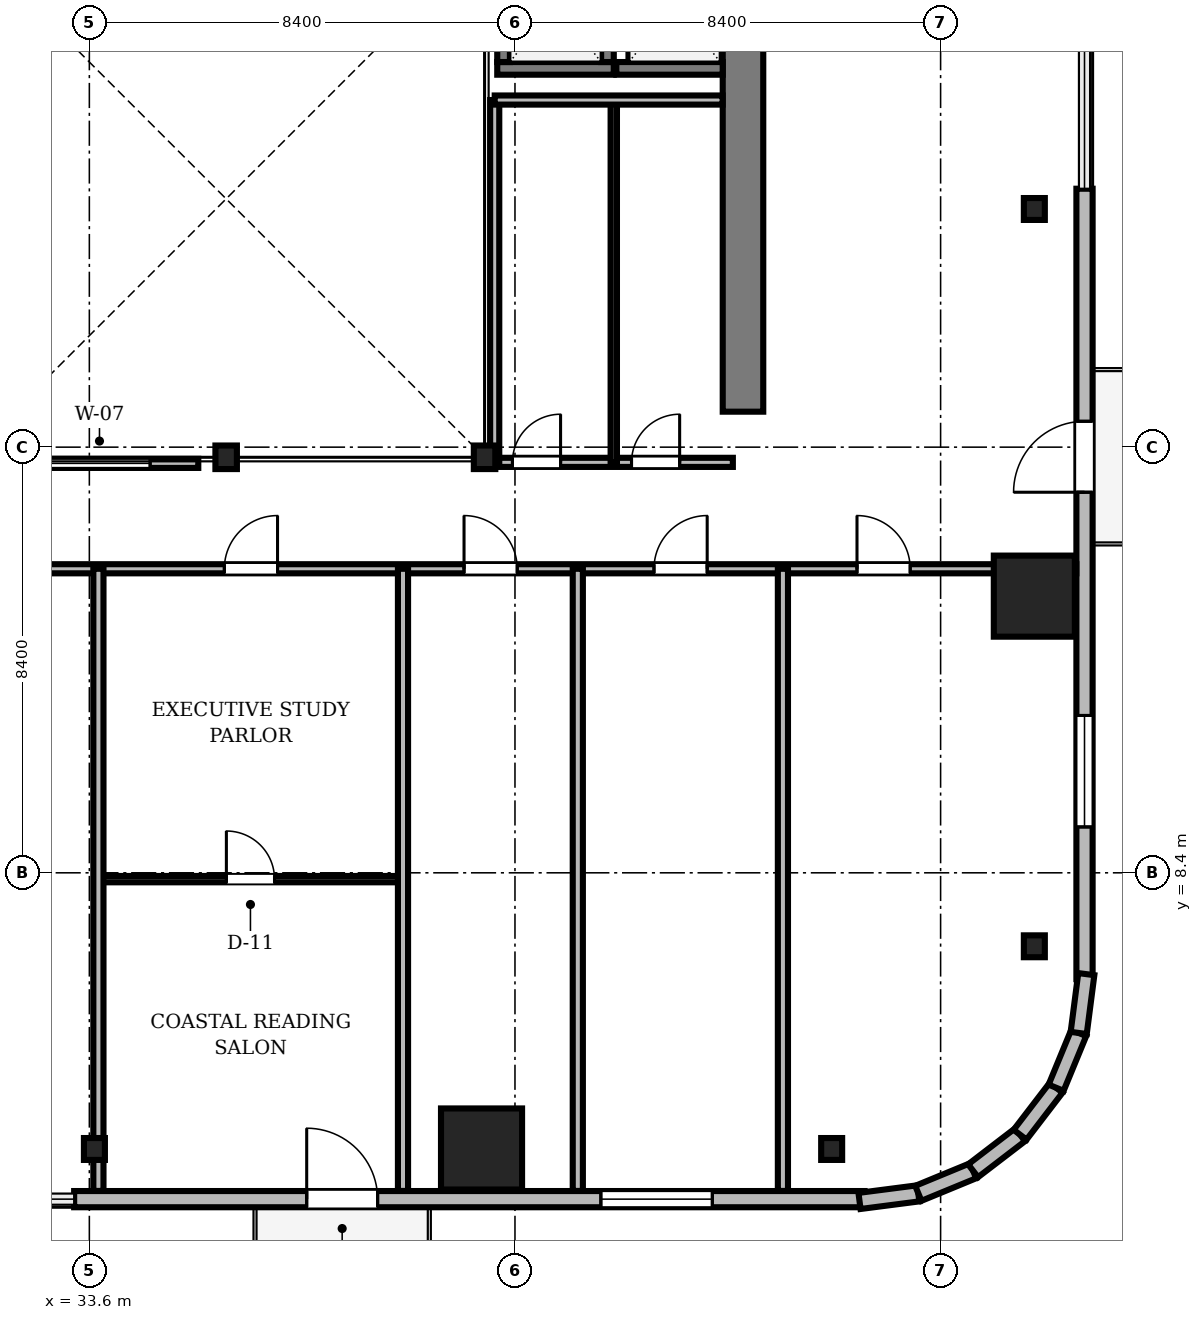
"""IFC4 building model, lengths in metres.
Left out: names, types, materials, properties, quantities, classifications, styles, units other than length and angle.
Written with IfcOpenShell. Run it as: python <this file> out.ifc"""

import sys

from ifc_helpers import new_model, si_unit, direction, frame, frame_2d, origin, origin_2d, place, context, subcontext, project, spatial, rectangle, i_section, extrude, source, transform, mapped, element, fill, save


model = new_model("IFC4")
c1 = context("Model", 3, precision=1e-05, world=origin(), true_north=direction((0.0, 1.0)))
c2 = subcontext(c1, "Body", "Model", "MODEL_VIEW")
j1 = project(units=[si_unit("LENGTHUNIT", "METRE"), si_unit("PLANEANGLEUNIT", "RADIAN")], contexts=[c1])
p1 = place(None, origin())
s1 = spatial("IfcSite", under=j1, at=p1, CompositionType="ELEMENT")
p2 = place(p1, origin())
s2 = spatial("IfcBuilding", under=s1, at=p2, CompositionType="ELEMENT")
p3 = place(p2, frame((0.0, 0.0, 137.2)))
s3 = spatial("IfcBuildingStorey", under=s2, at=p3, CompositionType="ELEMENT", Elevation=137.2)
m1 = source(origin(), c2, "Body", "SweptSolid", [
    extrude(rectangle(XDim=13.15, YDim=0.8, at=frame_2d((6.575, 0.0))), origin(), (0.0, 0.0, 1.0), 3.46),
])
p4 = place(p3, frame((46.5, 17.5, 0.0), z_axis=(0.0, 0.0, 1.0), x_axis=(0.0, 1.0, 0.0)))
e1 = element("IfcWall", 1, at=p4, inside=s3, PredefinedType="SHEAR", context=c2, shape_type="MappedRepresentation", body=[
    mapped(m1, transform((0.0, 0.0, 0.0), scale=1.0)),
])
m2 = source(origin(), c2, "Body", "SweptSolid", [
    extrude(i_section(OverallWidth=0.424, OverallDepth=0.465, WebThickness=0.035, FlangeThickness=0.056, FilletRadius=0.015, at=origin_2d()), origin(), (0.0, 0.0, 1.0), 3.46),
])
for number, where, z_axis, x_axis in (
    (2, (36.3, 16.6, 0.0), (0.0, 0.0, 1.0), (1.0, 0.0, 0.0)),
    (3, (41.4, 16.6, 0.0), (0.0, 0.0, 1.0), (1.0, 0.0, 0.0)),
):
    element("IfcColumn", number, at=place(p3, frame(where, z_axis=z_axis, x_axis=x_axis)), inside=s3, PredefinedType="COLUMN", context=c2, shape_type="MappedRepresentation", body=[
        mapped(m2, transform((0.0, 0.0, 0.0), scale=1.0)),
    ])
m3 = source(origin(), c2, "Body", "SweptSolid", [
    extrude(rectangle(XDim=1.6, YDim=1.6, at=origin_2d()), origin(), (0.0, 0.0, 1.0), 3.46),
])
for number, where, z_axis, x_axis in (
    (4, (41.34, 2.95, 0.0), (0.0, 0.0, 1.0), (1.0, 0.0, 0.0)),
    (5, (52.25, 13.86, 0.0), (0.0, 0.0, 1.0), (1.0, 0.0, 0.0)),
):
    element("IfcColumn", number, at=place(p3, frame(where, z_axis=z_axis, x_axis=x_axis)), inside=s3, PredefinedType="COLUMN", context=c2, shape_type="MappedRepresentation", body=[
        mapped(m3, transform((0.0, 0.0, 0.0), scale=1.0)),
    ])
m4 = source(origin(), c2, "Body", "SweptSolid", [
    extrude(i_section(OverallWidth=0.414, OverallDepth=0.432, WebThickness=0.026, FlangeThickness=0.04, FilletRadius=0.015, at=origin_2d()), origin(), (0.0, 0.0, 1.0), 3.46),
])
for number, where, z_axis, x_axis in (
    (6, (33.7, 2.95, 0.0), (0.0, 0.0, 1.0), (1.0, 0.0, 0.0)),
    (7, (48.25, 2.95, 0.0), (0.0, 0.0, 1.0), (1.0, 0.0, 0.0)),
    (8, (52.25, 6.95, 0.0), (0.0, 0.0, 1.0), (1.0, 0.0, 0.0)),
    (9, (52.25, 21.5, 0.0), (0.0, 0.0, 1.0), (1.0, 0.0, 0.0)),
):
    element("IfcColumn", number, at=place(p3, frame(where, z_axis=z_axis, x_axis=x_axis)), inside=s3, PredefinedType="COLUMN", context=c2, shape_type="MappedRepresentation", body=[
        mapped(m4, transform((0.0, 0.0, 0.0), scale=1.0)),
    ])
m5 = source(origin(), c2, "Body", "SweptSolid", [
    extrude(rectangle(XDim=15.6, YDim=0.32, at=frame_2d((7.8, 0.0))), origin(), (0.0, 0.0, 1.0), 3.46),
])
p5 = place(p3, frame((33.3, 1.96, 0.0), z_axis=(0.0, 0.0, 1.0), x_axis=(1.0, 0.0, 0.0)))
e10 = element("IfcWall", 10, at=p5, inside=s3, PredefinedType="SOLIDWALL", context=c2, shape_type="MappedRepresentation", body=[
    mapped(m5, transform((0.0, 0.0, 0.0), scale=1.0)),
])
m6 = source(origin(), c2, "Body", "SweptSolid", [
    extrude(rectangle(XDim=1.4, YDim=2.3, at=frame_2d((0.7, 1.15))), frame((0.0, 0.17, 0.0), z_axis=(0.0, -1.0, 0.0), x_axis=(1.0, 0.0, 0.0)), (0.0, 0.0, 1.0), 0.34),
])
p6 = place(p5, frame((4.59, 0.0, 0.0)))
e11 = element("IfcOpeningElement", 11, at=p6, cuts=e10, PredefinedType="OPENING", context=c2, shape_type="MappedRepresentation", body=[
    mapped(m6, transform((0.0, 0.0, 0.0), scale=1.0)),
])
m7 = source(origin(), c2, "Body", "SweptSolid", [
    extrude(rectangle(XDim=2.2, YDim=2.4, at=frame_2d((1.1, 1.2))), frame((0.0, 0.17, 0.0), z_axis=(0.0, -1.0, 0.0), x_axis=(1.0, 0.0, 0.0)), (0.0, 0.0, 1.0), 0.34),
])
p7 = place(p5, frame((10.395, 0.0, 0.72)))
e12 = element("IfcOpeningElement", 12, at=p7, cuts=e10, PredefinedType="OPENING", context=c2, shape_type="MappedRepresentation", body=[
    mapped(m7, transform((0.0, 0.0, 0.0), scale=1.0)),
])
p8 = place(p3, frame((53.24, 6.3, 0.0), z_axis=(0.0, 0.0, 1.0), x_axis=(0.0, 1.0, 0.0)))
e13 = element("IfcWall", 13, at=p8, inside=s3, PredefinedType="SOLIDWALL", context=c2, shape_type="MappedRepresentation", body=[
    mapped(m5, transform((0.0, 0.0, 0.0), scale=1.0)),
])
p9 = place(p8, frame((9.61, 0.0, 0.0)))
e14 = element("IfcOpeningElement", 14, at=p9, cuts=e13, PredefinedType="OPENING", context=c2, shape_type="MappedRepresentation", body=[
    mapped(m6, transform((0.0, 0.0, 0.0), scale=1.0)),
])
p10 = place(p8, frame((3.005, 0.0, 0.72)))
e15 = element("IfcOpeningElement", 15, at=p10, cuts=e13, PredefinedType="OPENING", context=c2, shape_type="MappedRepresentation", body=[
    mapped(m7, transform((0.0, 0.0, 0.0), scale=1.0)),
])
m8 = source(origin(), c2, "Body", "SweptSolid", [
    extrude(rectangle(XDim=1.17, YDim=0.32, at=frame_2d((0.585, 0.0))), origin(), (0.0, 0.0, 1.0), 3.46),
])
p11 = place(p3, frame((48.8, 1.925, 0.0), z_axis=(0.0, 0.0, 1.0), x_axis=(0.991762485493, 0.128090485085, 0.0)))
e16 = element("IfcWall", 16, at=p11, inside=s3, PredefinedType="SOLIDWALL", context=c2, shape_type="MappedRepresentation", body=[
    mapped(m8, transform((0.0, 0.0, 0.0), scale=1.0)),
])
m9 = source(origin(), c2, "Body", "SweptSolid", [
    extrude(rectangle(XDim=1.169, YDim=0.32, at=frame_2d((0.585, 0.0))), origin(), (0.0, 0.0, 1.0), 3.46),
])
p12 = place(p3, frame((49.96, 2.074, 0.0), z_axis=(0.0, 0.0, 1.0), x_axis=(0.924479075121, 0.381232789334, 0.0)))
e17 = element("IfcWall", 17, at=p12, inside=s3, PredefinedType="SOLIDWALL", context=c2, shape_type="MappedRepresentation", body=[
    mapped(m9, transform((0.0, 0.0, 0.0), scale=1.0)),
])
m10 = source(origin(), c2, "Body", "SweptSolid", [
    extrude(rectangle(XDim=1.169, YDim=0.32, at=frame_2d((0.584, 0.0))), origin(), (0.0, 0.0, 1.0), 3.46),
])
p13 = place(p3, frame((51.041, 2.52, 0.0), z_axis=(0.0, 0.0, 1.0), x_axis=(0.793663520347, 0.608356981114, 0.0)))
e18 = element("IfcWall", 18, at=p13, inside=s3, PredefinedType="SOLIDWALL", context=c2, shape_type="MappedRepresentation", body=[
    mapped(m10, transform((0.0, 0.0, 0.0), scale=1.0)),
])
m11 = source(origin(), c2, "Body", "SweptSolid", [
    extrude(rectangle(XDim=1.169, YDim=0.32, at=frame_2d((0.584, 0.0))), origin(), (0.0, 0.0, 1.0), 3.46),
])
for number, where, z_axis, x_axis in (
    (19, (51.969, 3.231, 0.0), (0.0, 0.0, 1.0), (0.608, 0.794, 0.0)),
    (20, (52.68, 4.159, 0.0), (0.0, 0.0, 1.0), (0.381, 0.925, 0.0)),
):
    element("IfcWall", number, at=place(p3, frame(where, z_axis=z_axis, x_axis=x_axis)), inside=s3, PredefinedType="SOLIDWALL", context=c2, shape_type="MappedRepresentation", body=[
        mapped(m11, transform((0.0, 0.0, 0.0), scale=1.0)),
    ])
m12 = source(origin(), c2, "Body", "SweptSolid", [
    extrude(rectangle(XDim=1.171, YDim=0.32, at=frame_2d((0.585, 0.0))), origin(), (0.0, 0.0, 1.0), 3.46),
])
p14 = place(p3, frame((53.125, 5.24, 0.0), z_axis=(0.0, 0.0, 1.0), x_axis=(0.128269133229, 0.991739395941, 0.0)))
e21 = element("IfcWall", 21, at=p14, inside=s3, PredefinedType="SOLIDWALL", context=c2, shape_type="MappedRepresentation", body=[
    mapped(m12, transform((0.0, 0.0, 0.0), scale=1.0)),
])
m13 = source(origin(), c2, "Body", "SweptSolid", [
    extrude(rectangle(XDim=2.3, YDim=0.25, at=frame_2d((1.15, 0.0))), origin(), (0.0, 0.0, 1.0), 3.46),
])
for number, where, z_axis, x_axis in (
    (22, (41.65, 24.275, 0.0), (0.0, 0.0, 1.0), (1.0, 0.0, 0.0)),
    (23, (41.775, 24.4, 0.0), (0.0, 0.0, 1.0), (0.0, 1.0, 0.0)),
    (24, (43.825, 24.4, 0.0), (0.0, 0.0, 1.0), (0.0, 1.0, 0.0)),
):
    element("IfcWall", number, at=place(p3, frame(where, z_axis=z_axis, x_axis=x_axis)), inside=s3, PredefinedType="SOLIDWALL", context=c2, shape_type="MappedRepresentation", body=[
        mapped(m13, transform((0.0, 0.0, 0.0), scale=1.0)),
    ])
m14 = source(origin(), c2, "Body", "SweptSolid", [
    extrude(rectangle(XDim=2.1, YDim=0.25, at=frame_2d((1.05, 0.0))), origin(), (0.0, 0.0, 1.0), 3.46),
])
p15 = place(p3, frame((44.0, 24.275, 0.0), z_axis=(0.0, 0.0, 1.0), x_axis=(1.0, 0.0, 0.0)))
e25 = element("IfcWall", 25, at=p15, inside=s3, PredefinedType="SOLIDWALL", context=c2, shape_type="MappedRepresentation", body=[
    mapped(m14, transform((0.0, 0.0, 0.0), scale=1.0)),
])
m15 = source(origin(), c2, "Body", "SweptSolid", [
    extrude(rectangle(XDim=46.156, YDim=0.18, at=frame_2d((23.078, 0.0))), origin(), (0.0, 0.0, 1.0), 2.702),
])
p16 = place(p3, frame((6.922, 14.4, 0.0), z_axis=(0.0, 0.0, 1.0), x_axis=(1.0, 0.0, 0.0)))
e26 = element("IfcWall", 26, at=p16, inside=s3, PredefinedType="PARTITIONING", context=c2, shape_type="MappedRepresentation", body=[
    mapped(m15, transform((0.0, 0.0, 0.0), scale=1.0)),
])
m16 = source(origin(), c2, "Body", "SweptSolid", [
    extrude(rectangle(XDim=1.05, YDim=2.2, at=frame_2d((0.525, 1.1))), frame((0.0, 0.1, 0.0), z_axis=(0.0, -1.0, 0.0), x_axis=(1.0, 0.0, 0.0)), (0.0, 0.0, 1.0), 0.2),
])
p17 = place(p16, frame((14.998, 0.0, 0.0)))
e27 = element("IfcOpeningElement", 27, at=p17, cuts=e26, PredefinedType="OPENING", context=c2, shape_type="MappedRepresentation", body=[
    mapped(m16, transform((0.0, 0.0, 0.0), scale=1.0)),
])
p18 = place(p16, frame((17.553, 0.0, 0.0)))
e28 = element("IfcOpeningElement", 28, at=p18, cuts=e26, PredefinedType="OPENING", context=c2, shape_type="MappedRepresentation", body=[
    mapped(m16, transform((0.0, 0.0, 0.0), scale=1.0)),
])
p19 = place(p16, frame((21.003, 0.0, 0.0)))
e29 = element("IfcOpeningElement", 29, at=p19, cuts=e26, PredefinedType="OPENING", context=c2, shape_type="MappedRepresentation", body=[
    mapped(m16, transform((0.0, 0.0, 0.0), scale=1.0)),
])
p20 = place(p16, frame((24.532, 0.0, 0.0)))
e30 = element("IfcOpeningElement", 30, at=p20, cuts=e26, PredefinedType="OPENING", context=c2, shape_type="MappedRepresentation", body=[
    mapped(m16, transform((0.0, 0.0, 0.0), scale=1.0)),
])
p21 = place(p16, frame((29.342, 0.0, 0.0)))
e31 = element("IfcOpeningElement", 31, at=p21, cuts=e26, PredefinedType="OPENING", context=c2, shape_type="MappedRepresentation", body=[
    mapped(m16, transform((0.0, 0.0, 0.0), scale=1.0)),
])
p22 = place(p16, frame((34.073, 0.0, 0.0)))
e32 = element("IfcOpeningElement", 32, at=p22, cuts=e26, PredefinedType="OPENING", context=c2, shape_type="MappedRepresentation", body=[
    mapped(m16, transform((0.0, 0.0, 0.0), scale=1.0)),
])
p23 = place(p16, frame((37.822, 0.0, 0.0)))
e33 = element("IfcOpeningElement", 33, at=p23, cuts=e26, PredefinedType="OPENING", context=c2, shape_type="MappedRepresentation", body=[
    mapped(m16, transform((0.0, 0.0, 0.0), scale=1.0)),
])
p24 = place(p16, frame((41.828, 0.0, 0.0)))
e34 = element("IfcOpeningElement", 34, at=p24, cuts=e26, PredefinedType="OPENING", context=c2, shape_type="MappedRepresentation", body=[
    mapped(m16, transform((0.0, 0.0, 0.0), scale=1.0)),
])
m17 = source(origin(), c2, "Body", "SweptSolid", [
    extrude(rectangle(XDim=6.011, YDim=0.125, at=frame_2d((3.005, 0.0))), origin(), (0.0, 0.0, 1.0), 2.852),
])
p25 = place(p3, frame((33.779, 8.275, 0.0), z_axis=(0.0, 0.0, 1.0), x_axis=(1.0, 0.0, 0.0)))
e35 = element("IfcWall", 35, at=p25, inside=s3, PredefinedType="PARTITIONING", context=c2, shape_type="MappedRepresentation", body=[
    mapped(m17, transform((0.0, 0.0, 0.0), scale=1.0)),
])
m18 = source(origin(), c2, "Body", "SweptSolid", [
    extrude(rectangle(XDim=0.95, YDim=2.15, at=frame_2d((0.475, 1.075))), frame((0.0, 0.073, 0.0), z_axis=(0.0, -1.0, 0.0), x_axis=(1.0, 0.0, 0.0)), (0.0, 0.0, 1.0), 0.145),
])
p26 = place(p25, frame((2.525, 0.0, 0.0)))
e36 = element("IfcOpeningElement", 36, at=p26, cuts=e35, PredefinedType="OPENING", context=c2, shape_type="MappedRepresentation", body=[
    mapped(m18, transform((0.0, 0.0, 0.0), scale=1.0)),
])
m19 = source(origin(), c2, "Body", "SweptSolid", [
    extrude(rectangle(XDim=4.7, YDim=0.18, at=frame_2d((2.35, 0.0))), origin(), (0.0, 0.0, 1.0), 2.852),
])
p27 = place(p3, frame((41.6, 16.5, 0.0), z_axis=(0.0, 0.0, 1.0), x_axis=(1.0, 0.0, 0.0)))
e37 = element("IfcWall", 37, at=p27, inside=s3, PredefinedType="PARTITIONING", context=c2, shape_type="MappedRepresentation", body=[
    mapped(m19, transform((0.0, 0.0, 0.0), scale=1.0)),
])
m20 = source(origin(), c2, "Body", "SweptSolid", [
    extrude(rectangle(XDim=0.95, YDim=2.15, at=frame_2d((0.475, 1.075))), frame((0.0, 0.1, 0.0), z_axis=(0.0, -1.0, 0.0), x_axis=(1.0, 0.0, 0.0)), (0.0, 0.0, 1.0), 0.2),
])
p28 = place(p27, frame((0.35, 0.0, 0.0)))
e38 = element("IfcOpeningElement", 38, at=p28, cuts=e37, PredefinedType="OPENING", context=c2, shape_type="MappedRepresentation", body=[
    mapped(m20, transform((0.0, 0.0, 0.0), scale=1.0)),
])
p29 = place(p27, frame((2.7, 0.0, 0.0)))
e39 = element("IfcOpeningElement", 39, at=p29, cuts=e37, PredefinedType="OPENING", context=c2, shape_type="MappedRepresentation", body=[
    mapped(m20, transform((0.0, 0.0, 0.0), scale=1.0)),
])
m21 = source(origin(), c2, "Body", "SweptSolid", [
    extrude(rectangle(XDim=12.278, YDim=0.2, at=frame_2d((6.139, 0.0))), origin(), (0.0, 0.0, 1.0), 2.702),
])
for number, where, z_axis, x_axis in (
    (40, (33.779, 2.122, 0.0), (0.0, 0.0, 1.0), (0.0, 1.0, 0.0)),
    (41, (39.79, 2.122, 0.0), (0.0, 0.0, 1.0), (0.0, 1.0, 0.0)),
    (42, (43.24, 2.122, 0.0), (0.0, 0.0, 1.0), (0.0, 1.0, 0.0)),
    (43, (47.288, 2.122, 0.0), (0.0, 0.0, 1.0), (0.0, 1.0, 0.0)),
):
    element("IfcWall", number, at=place(p3, frame(where, z_axis=z_axis, x_axis=x_axis)), inside=s3, PredefinedType="PARTITIONING", context=c2, shape_type="MappedRepresentation", body=[
        mapped(m21, transform((0.0, 0.0, 0.0), scale=1.0)),
    ])
m22 = source(origin(), c2, "Body", "SweptSolid", [
    extrude(rectangle(XDim=7.15, YDim=0.18, at=frame_2d((3.575, 0.0))), origin(), (0.0, 0.0, 1.0), 2.852),
])
p30 = place(p3, frame((41.6, 16.5, 0.0), z_axis=(0.0, 0.0, 1.0), x_axis=(0.0, 1.0, 0.0)))
e44 = element("IfcWall", 44, at=p30, inside=s3, PredefinedType="PARTITIONING", context=c2, shape_type="MappedRepresentation", body=[
    mapped(m22, transform((0.0, 0.0, 0.0), scale=1.0)),
])
m23 = source(origin(), c2, "Body", "SweptSolid", [
    extrude(rectangle(XDim=7.15, YDim=0.125, at=frame_2d((3.575, 0.0))), origin(), (0.0, 0.0, 1.0), 2.852),
])
p31 = place(p3, frame((43.95, 16.5, 0.0), z_axis=(0.0, 0.0, 1.0), x_axis=(0.0, 1.0, 0.0)))
e45 = element("IfcWall", 45, at=p31, inside=s3, PredefinedType="PARTITIONING", context=c2, shape_type="MappedRepresentation", body=[
    mapped(m23, transform((0.0, 0.0, 0.0), scale=1.0)),
])
m24 = source(origin(), c2, "Body", "SweptSolid", [
    extrude(rectangle(XDim=4.498, YDim=0.18, at=frame_2d((2.249, 0.0))), origin(), (0.0, 0.0, 1.0), 3.46),
])
p32 = place(p3, frame((41.6, 23.65, 0.0), z_axis=(0.0, 0.0, 1.0), x_axis=(1.0, 0.0, 0.0)))
e46 = element("IfcWall", 46, at=p32, inside=s3, PredefinedType="PARTITIONING", context=c2, shape_type="MappedRepresentation", body=[
    mapped(m24, transform((0.0, 0.0, 0.0), scale=1.0)),
])
m25 = source(origin(), c2, "Body", "SweptSolid", [
    extrude(rectangle(XDim=3.9, YDim=0.18, at=frame_2d((1.95, 0.0))), origin(), (0.0, 0.0, 1.0), 3.002),
])
p33 = place(p3, frame((31.85, 16.48, 0.0), z_axis=(0.0, 0.0, 1.0), x_axis=(1.0, 0.0, 0.0)))
e47 = element("IfcWall", 47, at=p33, inside=s3, PredefinedType="PARTITIONING", context=c2, shape_type="MappedRepresentation", body=[
    mapped(m25, transform((0.0, 0.0, 0.0), scale=1.0)),
])
m26 = source(origin(), c2, "Body", "SweptSolid", [
    extrude(rectangle(XDim=2.0, YDim=1.9, at=frame_2d((1.0, 0.95))), frame((0.0, 0.1, 0.0), z_axis=(0.0, -1.0, 0.0), x_axis=(1.0, 0.0, 0.0)), (0.0, 0.0, 1.0), 0.2),
])
p34 = place(p33, frame((0.95, 0.0, 0.55)))
e48 = element("IfcOpeningElement", 48, at=p34, cuts=e47, PredefinedType="OPENING", context=c2, shape_type="MappedRepresentation", body=[
    mapped(m26, transform((0.0, 0.0, 0.0), scale=1.0)),
])
m27 = source(origin(), c2, "Body", "SweptSolid", [
    extrude(rectangle(XDim=1.4, YDim=2.3, at=frame_2d((0.7, 1.15))), frame((0.0, 0.025, 0.0), z_axis=(0.0, -1.0, 0.0), x_axis=(1.0, 0.0, 0.0)), (0.0, 0.0, 1.0), 0.05),
])
p35 = place(p6, frame((1.4, 0.0, 0.0), z_axis=(0.0, 0.0, 1.0), x_axis=(-1.0, 0.0, 0.0)))
e49 = element("IfcDoor", 49, at=p35, inside=s3, OperationType="DOUBLE_DOOR_SLIDING", PredefinedType="DOOR", context=c2, shape_type="MappedRepresentation", body=[
    mapped(m27, transform((0.0, 0.0, 0.0), scale=1.0)),
])
fill(e11, e49)
m28 = source(origin(), c2, "Body", "SweptSolid", [
    extrude(rectangle(XDim=2.2, YDim=2.4, at=frame_2d((1.1, 1.2))), frame((0.0, 0.03, 0.0), z_axis=(0.0, -1.0, 0.0), x_axis=(1.0, 0.0, 0.0)), (0.0, 0.0, 1.0), 0.06),
])
p36 = place(p7, origin())
e50 = element("IfcWindow", 50, at=p36, inside=s3, PartitioningType="SINGLE_PANEL", PredefinedType="WINDOW", context=c2, shape_type="MappedRepresentation", body=[
    mapped(m28, transform((0.0, 0.0, 0.0), scale=1.0)),
])
fill(e12, e50)
p37 = place(p9, frame((1.4, 0.0, 0.0), z_axis=(0.0, 0.0, 1.0), x_axis=(-1.0, 0.0, 0.0)))
e51 = element("IfcDoor", 51, at=p37, inside=s3, OperationType="DOUBLE_DOOR_SLIDING", PredefinedType="DOOR", context=c2, shape_type="MappedRepresentation", body=[
    mapped(m27, transform((0.0, 0.0, 0.0), scale=1.0)),
])
fill(e14, e51)
p38 = place(p10, origin())
e52 = element("IfcWindow", 52, at=p38, inside=s3, PartitioningType="SINGLE_PANEL", PredefinedType="WINDOW", context=c2, shape_type="MappedRepresentation", body=[
    mapped(m28, transform((0.0, 0.0, 0.0), scale=1.0)),
])
fill(e15, e52)
m29 = source(origin(), c2, "Body", "SweptSolid", [
    extrude(rectangle(XDim=1.05, YDim=2.2, at=frame_2d((0.525, 1.1))), frame((0.0, 0.025, 0.0), z_axis=(0.0, -1.0, 0.0), x_axis=(1.0, 0.0, 0.0)), (0.0, 0.0, 1.0), 0.05),
])
p39 = place(p21, origin())
e53 = element("IfcDoor", 53, at=p39, inside=s3, OperationType="SINGLE_SWING_RIGHT", PredefinedType="DOOR", context=c2, shape_type="MappedRepresentation", body=[
    mapped(m29, transform((0.0, 0.0, 0.0), scale=1.0)),
])
fill(e31, e53)
p40 = place(p22, origin())
e54 = element("IfcDoor", 54, at=p40, inside=s3, OperationType="SINGLE_SWING_LEFT", PredefinedType="DOOR", context=c2, shape_type="MappedRepresentation", body=[
    mapped(m29, transform((0.0, 0.0, 0.0), scale=1.0)),
])
fill(e32, e54)
p41 = place(p23, origin())
e55 = element("IfcDoor", 55, at=p41, inside=s3, OperationType="SINGLE_SWING_RIGHT", PredefinedType="DOOR", context=c2, shape_type="MappedRepresentation", body=[
    mapped(m29, transform((0.0, 0.0, 0.0), scale=1.0)),
])
fill(e33, e55)
p42 = place(p24, origin())
e56 = element("IfcDoor", 56, at=p42, inside=s3, OperationType="SINGLE_SWING_LEFT", PredefinedType="DOOR", context=c2, shape_type="MappedRepresentation", body=[
    mapped(m29, transform((0.0, 0.0, 0.0), scale=1.0)),
])
fill(e34, e56)
m30 = source(origin(), c2, "Body", "SweptSolid", [
    extrude(rectangle(XDim=0.95, YDim=2.15, at=frame_2d((0.475, 1.075))), frame((0.0, 0.025, 0.0), z_axis=(0.0, -1.0, 0.0), x_axis=(1.0, 0.0, 0.0)), (0.0, 0.0, 1.0), 0.05),
])
p43 = place(p26, origin())
e57 = element("IfcDoor", 57, at=p43, inside=s3, OperationType="SINGLE_SWING_LEFT", PredefinedType="DOOR", context=c2, shape_type="MappedRepresentation", body=[
    mapped(m30, transform((0.0, 0.0, 0.0), scale=1.0)),
])
fill(e36, e57)
p44 = place(p28, origin())
e58 = element("IfcDoor", 58, at=p44, inside=s3, OperationType="SINGLE_SWING_RIGHT", PredefinedType="DOOR", context=c2, shape_type="MappedRepresentation", body=[
    mapped(m30, transform((0.0, 0.0, 0.0), scale=1.0)),
])
fill(e38, e58)
p45 = place(p29, origin())
e59 = element("IfcDoor", 59, at=p45, inside=s3, OperationType="SINGLE_SWING_RIGHT", PredefinedType="DOOR", context=c2, shape_type="MappedRepresentation", body=[
    mapped(m30, transform((0.0, 0.0, 0.0), scale=1.0)),
])
fill(e39, e59)
m31 = source(origin(), c2, "Body", "SweptSolid", [
    extrude(rectangle(XDim=2.0, YDim=1.9, at=frame_2d((1.0, 0.95))), frame((0.0, 0.03, 0.0), z_axis=(0.0, -1.0, 0.0), x_axis=(1.0, 0.0, 0.0)), (0.0, 0.0, 1.0), 0.06),
])
p46 = place(p34, origin())
e60 = element("IfcWindow", 60, at=p46, inside=s3, PartitioningType="SINGLE_PANEL", PredefinedType="WINDOW", context=c2, shape_type="MappedRepresentation", body=[
    mapped(m31, transform((0.0, 0.0, 0.0), scale=1.0)),
])
fill(e48, e60)
save(model, sys.argv[1])
